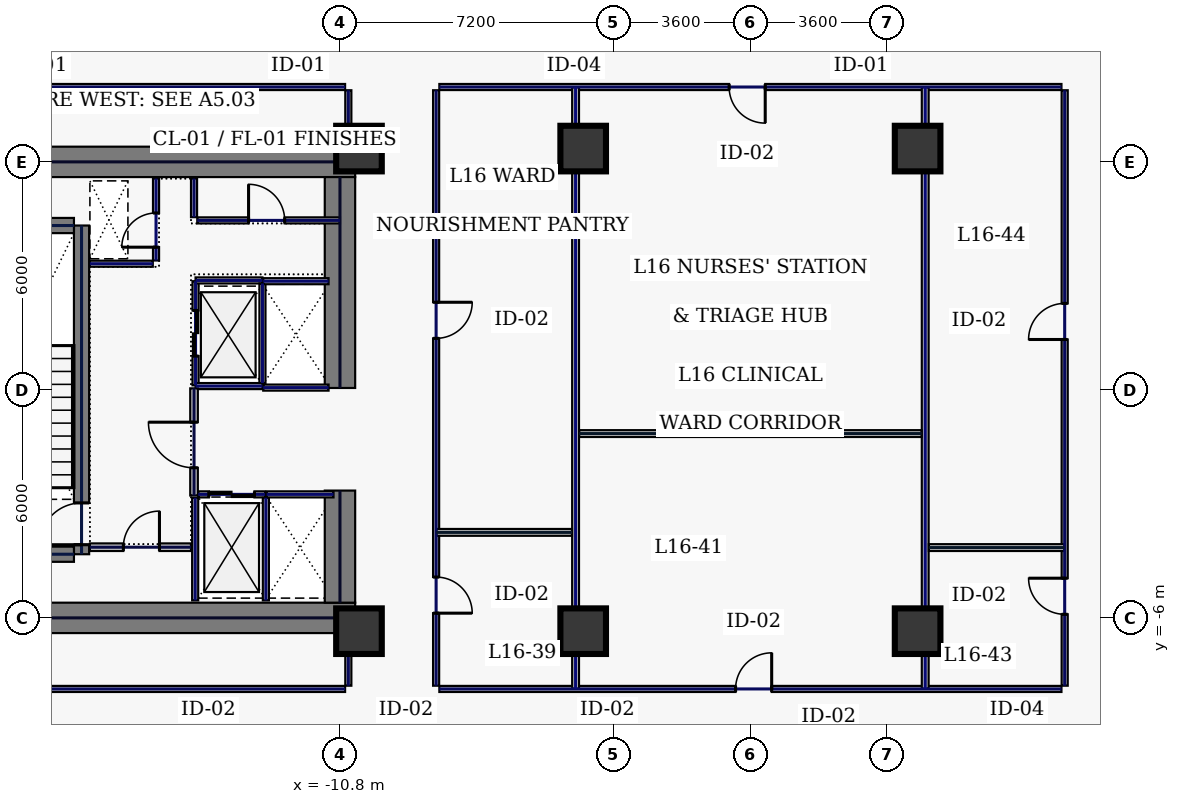
"""IFC4 building model, lengths in metres.
Left out: names, types, materials, properties, quantities, classifications, styles, units other than length and angle.
Written with IfcOpenShell. Run it as: python <this file> out.ifc"""

import sys

from ifc_helpers import new_model, si_unit, direction, frame, frame_2d, origin, origin_2d, place, context, subcontext, project, spatial, rectangle, hollow_rectangle, extrude, element, fill, save


model = new_model("IFC4")
c1 = context("Model", 3, precision=1e-05, world=origin(), true_north=direction((0.0, 1.0)))
c2 = subcontext(c1, "Body", "Model", "MODEL_VIEW")
j1 = project(units=[si_unit("LENGTHUNIT", "METRE"), si_unit("PLANEANGLEUNIT", "RADIAN")], contexts=[c1])
p1 = place(None, origin())
s1 = spatial("IfcSite", under=j1, at=p1, CompositionType="ELEMENT")
p2 = place(p1, origin())
s2 = spatial("IfcBuilding", under=s1, at=p2, CompositionType="ELEMENT")
p3 = place(p2, frame((0.0, 0.0, 75.4)))
s3 = spatial("IfcBuildingStorey", under=s2, at=p3, CompositionType="ELEMENT", Elevation=75.4)
for number, where, z_axis, x_axis in (
    (1, (-22.0, 6.0, 0.0), (0.0, 0.0, 1.0), (1.0, 0.0, 0.0)),
    (2, (-22.0, -6.0, 0.0), (0.0, 0.0, 1.0), (1.0, 0.0, 0.0)),
):
    element("IfcWall", number, at=place(p3, frame(where, z_axis=z_axis, x_axis=x_axis)), inside=s3, PredefinedType="SHEAR", context=c2, shape_type="SweptSolid", body=[
        extrude(rectangle(XDim=11.6, YDim=0.8, at=frame_2d((5.8, 0.0))), origin(), (0.0, 0.0, 1.0), 3.74),
    ])
p4 = place(p3, frame((-10.8, -5.6, 0.0), z_axis=(0.0, 0.0, 1.0), x_axis=(0.0, 1.0, 0.0)))
e3 = element("IfcWall", 3, at=p4, inside=s3, PredefinedType="SHEAR", context=c2, shape_type="SweptSolid", body=[
    extrude(rectangle(XDim=2.95, YDim=0.8, at=frame_2d((1.475, 0.0))), origin(), (0.0, 0.0, 1.0), 3.74),
])
p5 = place(p3, frame((-10.8, 0.05, 0.0), z_axis=(0.0, 0.0, 1.0), x_axis=(0.0, 1.0, 0.0)))
e4 = element("IfcWall", 4, at=p5, inside=s3, PredefinedType="SHEAR", context=c2, shape_type="SweptSolid", body=[
    extrude(rectangle(XDim=5.55, YDim=0.8, at=frame_2d((2.775, 0.0))), origin(), (0.0, 0.0, 1.0), 3.74),
])
p6 = place(p3, frame((-17.6, -4.325, 0.0), z_axis=(0.0, 0.0, 1.0), x_axis=(0.0, 1.0, 0.0)))
e5 = element("IfcWall", 5, at=p6, inside=s3, PredefinedType="SHEAR", context=c2, shape_type="SweptSolid", body=[
    extrude(rectangle(XDim=8.65, YDim=0.4, at=frame_2d((4.325, 0.0))), origin(), (0.0, 0.0, 1.0), 3.74),
])
p7 = place(p6, frame((0.25, 0.0, 0.0)))
e6 = element("IfcOpeningElement", 6, at=p7, cuts=e5, PredefinedType="OPENING", context=c2, shape_type="SweptSolid", body=[
    extrude(rectangle(XDim=1.1, YDim=2.2, at=frame_2d((0.55, 1.1))), frame((0.0, 0.21, 0.0), z_axis=(0.0, -1.0, 0.0), x_axis=(1.0, 0.0, 0.0)), (0.0, 0.0, 1.0), 0.42),
])
for number, where, z_axis, x_axis in (
    (7, (-21.2, -4.325, 0.0), (0.0, 0.0, 1.0), (1.0, 0.0, 0.0)),
    (8, (-21.2, 4.325, 0.0), (0.0, 0.0, 1.0), (1.0, 0.0, 0.0)),
):
    element("IfcWall", number, at=place(p3, frame(where, z_axis=z_axis, x_axis=x_axis)), inside=s3, PredefinedType="SHEAR", context=c2, shape_type="SweptSolid", body=[
        extrude(rectangle(XDim=3.4, YDim=0.4, at=frame_2d((1.7, 0.0))), origin(), (0.0, 0.0, 1.0), 3.74),
    ])
for number, where, z_axis, x_axis in (
    (9, (-10.3, -6.35, 0.0), (0.0, 0.0, 1.0), (1.0, 0.0, 0.0)),
    (10, (-10.3, 6.35, 0.0), (0.0, 0.0, 1.0), (1.0, 0.0, 0.0)),
    (11, (-4.4, -6.35, 0.0), (0.0, 0.0, 1.0), (1.0, 0.0, 0.0)),
    (12, (4.4, -6.35, 0.0), (0.0, 0.0, 1.0), (1.0, 0.0, 0.0)),
    (13, (-4.4, 6.35, 0.0), (0.0, 0.0, 1.0), (1.0, 0.0, 0.0)),
    (14, (4.4, 6.35, 0.0), (0.0, 0.0, 1.0), (1.0, 0.0, 0.0)),
):
    element("IfcColumn", number, at=place(p3, frame(where, z_axis=z_axis, x_axis=x_axis)), inside=s3, PredefinedType="COLUMN", context=c2, shape_type="SweptSolid", body=[
        extrude(hollow_rectangle(XDim=1.2, YDim=1.2, WallThickness=0.05, at=origin_2d()), origin(), (0.0, 0.0, 1.0), 3.74),
    ])
p8 = place(p3, frame((-14.6, 0.12, 0.0), z_axis=(0.0, 0.0, 1.0), x_axis=(0.0, 1.0, 0.0)))
e15 = element("IfcWall", 15, at=p8, inside=s3, PredefinedType="PARTITIONING", context=c2, shape_type="SweptSolid", body=[
    extrude(rectangle(XDim=2.74, YDim=0.16, at=frame_2d((1.37, 0.0))), origin(), (0.0, 0.0, 1.0), 3.74),
])
p9 = place(p8, frame((0.77, 0.0, 0.0)))
e16 = element("IfcOpeningElement", 16, at=p9, cuts=e15, PredefinedType="OPENING", context=c2, shape_type="SweptSolid", body=[
    extrude(rectangle(XDim=1.2, YDim=2.2, at=frame_2d((0.6, 1.1))), frame((0.0, 0.09, 0.0), z_axis=(0.0, -1.0, 0.0), x_axis=(1.0, 0.0, 0.0)), (0.0, 0.0, 1.0), 0.18),
])
for number, where, z_axis, x_axis in (
    (17, (-14.6, 0.1, 0.0), (0.0, 0.0, 1.0), (1.0, 0.0, 0.0)),
    (18, (-14.6, 2.88, 0.0), (0.0, 0.0, 1.0), (1.0, 0.0, 0.0)),
):
    element("IfcWall", number, at=place(p3, frame(where, z_axis=z_axis, x_axis=x_axis)), inside=s3, PredefinedType="PARTITIONING", context=c2, shape_type="SweptSolid", body=[
        extrude(rectangle(XDim=1.76, YDim=0.16, at=frame_2d((0.88, 0.0))), origin(), (0.0, 0.0, 1.0), 3.74),
    ])
p10 = place(p3, frame((-12.84, 0.18, 0.0), z_axis=(0.0, 0.0, 1.0), x_axis=(0.0, 1.0, 0.0)))
e19 = element("IfcWall", 19, at=p10, inside=s3, PredefinedType="PARTITIONING", context=c2, shape_type="SweptSolid", body=[
    extrude(rectangle(XDim=2.62, YDim=0.16, at=frame_2d((1.31, 0.0))), origin(), (0.0, 0.0, 1.0), 3.74),
])
p11 = place(p3, frame((-14.53, -2.75, 0.0), z_axis=(0.0, 0.0, 1.0), x_axis=(1.0, 0.0, 0.0)))
e20 = element("IfcWall", 20, at=p11, inside=s3, PredefinedType="PARTITIONING", context=c2, shape_type="SweptSolid", body=[
    extrude(rectangle(XDim=1.76, YDim=0.16, at=frame_2d((0.88, 0.0))), origin(), (0.0, 0.0, 1.0), 3.74),
])
p12 = place(p11, frame((0.28, 0.0, 0.0)))
e21 = element("IfcOpeningElement", 21, at=p12, cuts=e20, PredefinedType="OPENING", context=c2, shape_type="SweptSolid", body=[
    extrude(rectangle(XDim=1.2, YDim=2.2, at=frame_2d((0.6, 1.1))), frame((0.0, 0.09, 0.0), z_axis=(0.0, -1.0, 0.0), x_axis=(1.0, 0.0, 0.0)), (0.0, 0.0, 1.0), 0.18),
])
for number, where, z_axis, x_axis in (
    (22, (-12.75, -5.54, 0.0), (0.0, 0.0, 1.0), (0.0, 1.0, 0.0)),
    (23, (-14.61, -5.54, 0.0), (0.0, 0.0, 1.0), (0.0, 1.0, 0.0)),
):
    element("IfcWall", number, at=place(p3, frame(where, z_axis=z_axis, x_axis=x_axis)), inside=s3, PredefinedType="PARTITIONING", context=c2, shape_type="SweptSolid", body=[
        extrude(rectangle(XDim=2.7, YDim=0.16, at=frame_2d((1.35, 0.0))), origin(), (0.0, 0.0, 1.0), 3.74),
    ])
p13 = place(p3, frame((-12.73, -2.75, 0.0), z_axis=(0.0, 0.0, 1.0), x_axis=(1.0, 0.0, 0.0)))
e24 = element("IfcWall", 24, at=p13, inside=s3, PredefinedType="PARTITIONING", context=c2, shape_type="SweptSolid", body=[
    extrude(rectangle(XDim=1.76, YDim=0.16, at=frame_2d((0.88, 0.0))), origin(), (0.0, 0.0, 1.0), 3.74),
])
for number, where, z_axis, x_axis in (
    (25, (-12.82, 0.06, 0.0), (0.0, 0.0, 1.0), (1.0, 0.0, 0.0)),
    (26, (-12.82, 2.86, 0.0), (0.0, 0.0, 1.0), (1.0, 0.0, 0.0)),
):
    element("IfcWall", number, at=place(p3, frame(where, z_axis=z_axis, x_axis=x_axis)), inside=s3, PredefinedType="PARTITIONING", context=c2, shape_type="SweptSolid", body=[
        extrude(rectangle(XDim=1.72, YDim=0.16, at=frame_2d((0.86, 0.0))), origin(), (0.0, 0.0, 1.0), 3.74),
    ])
p14 = place(p3, frame((-15.64, 3.405, 0.0), z_axis=(0.0, 0.0, 1.0), x_axis=(0.0, 1.0, 0.0)))
e27 = element("IfcWall", 27, at=p14, inside=s3, PredefinedType="PARTITIONING", context=c2, shape_type="SweptSolid", body=[
    extrude(rectangle(XDim=2.155, YDim=0.16, at=frame_2d((1.078, 0.0))), origin(), (0.0, 0.0, 1.0), 3.74),
])
p15 = place(p14, frame((0.35, 0.0, 0.0)))
e28 = element("IfcOpeningElement", 28, at=p15, cuts=e27, PredefinedType="OPENING", context=c2, shape_type="SweptSolid", body=[
    extrude(rectangle(XDim=0.9, YDim=2.2, at=frame_2d((0.45, 1.1))), frame((0.0, 0.09, 0.0), z_axis=(0.0, -1.0, 0.0), x_axis=(1.0, 0.0, 0.0)), (0.0, 0.0, 1.0), 0.18),
])
p16 = place(p3, frame((-17.38, 3.32, 0.0), z_axis=(0.0, 0.0, 1.0), x_axis=(1.0, 0.0, 0.0)))
e29 = element("IfcWall", 29, at=p16, inside=s3, PredefinedType="PARTITIONING", context=c2, shape_type="SweptSolid", body=[
    extrude(rectangle(XDim=1.655, YDim=0.16, at=frame_2d((0.827, 0.0))), origin(), (0.0, 0.0, 1.0), 3.74),
])
p17 = place(p3, frame((-17.38, -4.14, 0.0), z_axis=(0.0, 0.0, 1.0), x_axis=(1.0, 0.0, 0.0)))
e30 = element("IfcWall", 30, at=p17, inside=s3, PredefinedType="SOLIDWALL", context=c2, shape_type="SweptSolid", body=[
    extrude(rectangle(XDim=2.66, YDim=0.2, at=frame_2d((1.33, 0.0))), origin(), (0.0, 0.0, 1.0), 3.74),
])
p18 = place(p17, frame((0.88, 0.0, 0.0)))
e31 = element("IfcOpeningElement", 31, at=p18, cuts=e30, PredefinedType="OPENING", context=c2, shape_type="SweptSolid", body=[
    extrude(rectangle(XDim=0.95, YDim=2.2, at=frame_2d((0.475, 1.1))), frame((0.0, 0.11, 0.0), z_axis=(0.0, -1.0, 0.0), x_axis=(1.0, 0.0, 0.0)), (0.0, 0.0, 1.0), 0.22),
])
p19 = place(p3, frame((-14.555, 4.46, 0.0), z_axis=(0.0, 0.0, 1.0), x_axis=(1.0, 0.0, 0.0)))
e32 = element("IfcWall", 32, at=p19, inside=s3, PredefinedType="PARTITIONING", context=c2, shape_type="SweptSolid", body=[
    extrude(rectangle(XDim=3.755, YDim=0.16, at=frame_2d((1.877, 0.0))), origin(), (0.0, 0.0, 1.0), 3.74),
])
p20 = place(p19, frame((1.35, 0.0, 0.0)))
e33 = element("IfcOpeningElement", 33, at=p20, cuts=e32, PredefinedType="OPENING", context=c2, shape_type="SweptSolid", body=[
    extrude(rectangle(XDim=0.95, YDim=2.2, at=frame_2d((0.475, 1.1))), frame((0.0, 0.09, 0.0), z_axis=(0.0, -1.0, 0.0), x_axis=(1.0, 0.0, 0.0)), (0.0, 0.0, 1.0), 0.18),
])
p21 = place(p3, frame((-14.64, 4.545, 0.0), z_axis=(0.0, 0.0, 1.0), x_axis=(0.0, 1.0, 0.0)))
e34 = element("IfcWall", 34, at=p21, inside=s3, PredefinedType="PARTITIONING", context=c2, shape_type="SweptSolid", body=[
    extrude(rectangle(XDim=1.015, YDim=0.16, at=frame_2d((0.508, 0.0))), origin(), (0.0, 0.0, 1.0), 3.74),
])
p22 = place(p3, frame((-14.64, -2.78, 0.0), z_axis=(0.0, 0.0, 1.0), x_axis=(0.0, 1.0, 0.0)))
e35 = element("IfcWall", 35, at=p22, inside=s3, PredefinedType="SOLIDWALL", context=c2, shape_type="SweptSolid", body=[
    extrude(rectangle(XDim=2.82, YDim=0.2, at=frame_2d((1.41, 0.0))), origin(), (0.0, 0.0, 1.0), 3.74),
])
p23 = place(p22, frame((0.73, 0.0, 0.0)))
e36 = element("IfcOpeningElement", 36, at=p23, cuts=e35, PredefinedType="OPENING", context=c2, shape_type="SweptSolid", body=[
    extrude(rectangle(XDim=1.2, YDim=2.2, at=frame_2d((0.6, 1.1))), frame((0.0, 0.11, 0.0), z_axis=(0.0, -1.0, 0.0), x_axis=(1.0, 0.0, 0.0)), (0.0, 0.0, 1.0), 0.22),
])
p24 = place(p3, frame((8.27, -7.785, 0.0), z_axis=(0.0, 0.0, 1.0), x_axis=(0.0, 1.0, 0.0)))
e37 = element("IfcWall", 37, at=p24, inside=s3, PredefinedType="PARTITIONING", context=c2, shape_type="SweptSolid", body=[
    extrude(rectangle(XDim=15.67, YDim=0.16, at=frame_2d((7.835, 0.0))), origin(), (0.0, 0.0, 1.0), 3.74),
])
p25 = place(p24, frame((1.879, 0.0, 0.0)))
e38 = element("IfcOpeningElement", 38, at=p25, cuts=e37, PredefinedType="OPENING", context=c2, shape_type="SweptSolid", body=[
    extrude(rectangle(XDim=0.95, YDim=2.2, at=frame_2d((0.475, 1.1))), frame((0.0, 0.09, 0.0), z_axis=(0.0, -1.0, 0.0), x_axis=(1.0, 0.0, 0.0)), (0.0, 0.0, 1.0), 0.18),
])
p26 = place(p24, frame((9.111, 0.0, 0.0)))
e39 = element("IfcOpeningElement", 39, at=p26, cuts=e37, PredefinedType="OPENING", context=c2, shape_type="SweptSolid", body=[
    extrude(rectangle(XDim=0.95, YDim=2.2, at=frame_2d((0.475, 1.1))), frame((0.0, 0.09, 0.0), z_axis=(0.0, -1.0, 0.0), x_axis=(1.0, 0.0, 0.0)), (0.0, 0.0, 1.0), 0.18),
])
p27 = place(p3, frame((8.185, 7.97, 0.0), z_axis=(0.0, 0.0, 1.0), x_axis=(-1.0, 0.0, 0.0)))
e40 = element("IfcWall", 40, at=p27, inside=s3, PredefinedType="PARTITIONING", context=c2, shape_type="SweptSolid", body=[
    extrude(rectangle(XDim=16.37, YDim=0.16, at=frame_2d((8.185, 0.0))), origin(), (0.0, 0.0, 1.0), 3.74),
])
p28 = place(p27, frame((7.795, 0.0, 0.0)))
e41 = element("IfcOpeningElement", 41, at=p28, cuts=e40, PredefinedType="OPENING", context=c2, shape_type="SweptSolid", body=[
    extrude(rectangle(XDim=0.95, YDim=2.2, at=frame_2d((0.475, 1.1))), frame((0.0, 0.09, 0.0), z_axis=(0.0, -1.0, 0.0), x_axis=(1.0, 0.0, 0.0)), (0.0, 0.0, 1.0), 0.18),
])
p29 = place(p3, frame((-8.27, 7.885, 0.0), z_axis=(0.0, 0.0, 1.0), x_axis=(0.0, -1.0, 0.0)))
e42 = element("IfcWall", 42, at=p29, inside=s3, PredefinedType="PARTITIONING", context=c2, shape_type="SweptSolid", body=[
    extrude(rectangle(XDim=15.67, YDim=0.16, at=frame_2d((7.835, 0.0))), origin(), (0.0, 0.0, 1.0), 3.74),
])
p30 = place(p29, frame((12.811, 0.0, 0.0)))
e43 = element("IfcOpeningElement", 43, at=p30, cuts=e42, PredefinedType="OPENING", context=c2, shape_type="SweptSolid", body=[
    extrude(rectangle(XDim=0.95, YDim=2.2, at=frame_2d((0.475, 1.1))), frame((0.0, 0.09, 0.0), z_axis=(0.0, -1.0, 0.0), x_axis=(1.0, 0.0, 0.0)), (0.0, 0.0, 1.0), 0.18),
])
p31 = place(p29, frame((5.579, 0.0, 0.0)))
e44 = element("IfcOpeningElement", 44, at=p31, cuts=e42, PredefinedType="OPENING", context=c2, shape_type="SweptSolid", body=[
    extrude(rectangle(XDim=0.95, YDim=2.2, at=frame_2d((0.475, 1.1))), frame((0.0, 0.09, 0.0), z_axis=(0.0, -1.0, 0.0), x_axis=(1.0, 0.0, 0.0)), (0.0, 0.0, 1.0), 0.18),
])
p32 = place(p3, frame((-8.185, -7.87, 0.0), z_axis=(0.0, 0.0, 1.0), x_axis=(1.0, 0.0, 0.0)))
e45 = element("IfcWall", 45, at=p32, inside=s3, PredefinedType="PARTITIONING", context=c2, shape_type="SweptSolid", body=[
    extrude(rectangle(XDim=16.37, YDim=0.16, at=frame_2d((8.185, 0.0))), origin(), (0.0, 0.0, 1.0), 3.74),
])
p33 = place(p32, frame((7.795, 0.0, 0.0)))
e46 = element("IfcOpeningElement", 46, at=p33, cuts=e45, PredefinedType="OPENING", context=c2, shape_type="SweptSolid", body=[
    extrude(rectangle(XDim=0.95, YDim=2.2, at=frame_2d((0.475, 1.1))), frame((0.0, 0.09, 0.0), z_axis=(0.0, -1.0, 0.0), x_axis=(1.0, 0.0, 0.0)), (0.0, 0.0, 1.0), 0.18),
])
p34 = place(p3, frame((-10.58, -7.785, 0.0), z_axis=(0.0, 0.0, 1.0), x_axis=(0.0, 1.0, 0.0)))
e47 = element("IfcWall", 47, at=p34, inside=s3, PredefinedType="PARTITIONING", context=c2, shape_type="SweptSolid", body=[
    extrude(rectangle(XDim=1.365, YDim=0.16, at=frame_2d((0.683, 0.0))), origin(), (0.0, 0.0, 1.0), 3.74),
])
p35 = place(p3, frame((-10.58, 6.42, 0.0), z_axis=(0.0, 0.0, 1.0), x_axis=(0.0, 1.0, 0.0)))
e48 = element("IfcWall", 48, at=p35, inside=s3, PredefinedType="PARTITIONING", context=c2, shape_type="SweptSolid", body=[
    extrude(rectangle(XDim=1.465, YDim=0.16, at=frame_2d((0.732, 0.0))), origin(), (0.0, 0.0, 1.0), 3.74),
])
for number, where, z_axis, x_axis in (
    (49, (-10.665, 7.97, 0.0), (0.0, 0.0, 1.0), (-1.0, 0.0, 0.0)),
    (50, (-27.185, -7.87, 0.0), (0.0, 0.0, 1.0), (1.0, 0.0, 0.0)),
):
    element("IfcWall", number, at=place(p3, frame(where, z_axis=z_axis, x_axis=x_axis)), inside=s3, PredefinedType="PARTITIONING", context=c2, shape_type="SweptSolid", body=[
        extrude(rectangle(XDim=16.52, YDim=0.16, at=frame_2d((8.26, 0.0))), origin(), (0.0, 0.0, 1.0), 3.74),
    ])
for number, where, z_axis, x_axis in (
    (51, (-4.6, -7.865, 0.0), (0.0, 0.0, 1.0), (0.0, 1.0, 0.0)),
    (52, (4.6, -7.865, 0.0), (0.0, 0.0, 1.0), (0.0, 1.0, 0.0)),
):
    element("IfcWall", number, at=place(p3, frame(where, z_axis=z_axis, x_axis=x_axis)), inside=s3, PredefinedType="PARTITIONING", context=c2, shape_type="SweptSolid", body=[
        extrude(rectangle(XDim=15.83, YDim=0.18, at=frame_2d((7.915, 0.0))), origin(), (0.0, 0.0, 1.0), 2.935),
    ])
p36 = place(p3, frame((-4.505, -1.15, 0.0), z_axis=(0.0, 0.0, 1.0), x_axis=(1.0, 0.0, 0.0)))
e53 = element("IfcWall", 53, at=p36, inside=s3, PredefinedType="PARTITIONING", context=c2, shape_type="SweptSolid", body=[
    extrude(rectangle(XDim=9.01, YDim=0.18, at=frame_2d((4.505, 0.0))), origin(), (0.0, 0.0, 1.0), 3.74),
])
for number, where, z_axis, x_axis in (
    (54, (-8.265, -3.75, 0.0), (0.0, 0.0, 1.0), (1.0, 0.0, 0.0)),
    (55, (4.695, -4.15, 0.0), (0.0, 0.0, 1.0), (1.0, 0.0, 0.0)),
):
    element("IfcWall", number, at=place(p3, frame(where, z_axis=z_axis, x_axis=x_axis)), inside=s3, PredefinedType="PARTITIONING", context=c2, shape_type="SweptSolid", body=[
        extrude(rectangle(XDim=3.57, YDim=0.18, at=frame_2d((1.785, 0.0))), origin(), (0.0, 0.0, 1.0), 3.74),
    ])
p37 = place(p7, origin())
e56 = element("IfcDoor", 56, at=p37, inside=s3, OperationType="SINGLE_SWING_LEFT", PredefinedType="DOOR", context=c2, shape_type="SweptSolid", body=[
    extrude(rectangle(XDim=1.1, YDim=2.2, at=frame_2d((0.55, 1.1))), frame((0.0, 0.025, 0.0), z_axis=(0.0, -1.0, 0.0), x_axis=(1.0, 0.0, 0.0)), (0.0, 0.0, 1.0), 0.05),
])
fill(e6, e56)
p38 = place(p9, origin())
e57 = element("IfcDoor", 57, at=p38, inside=s3, OperationType="SLIDING_TO_LEFT", PredefinedType="DOOR", context=c2, shape_type="SweptSolid", body=[
    extrude(rectangle(XDim=1.2, YDim=2.2, at=frame_2d((0.6, 1.1))), frame((0.0, 0.025, 0.0), z_axis=(0.0, -1.0, 0.0), x_axis=(1.0, 0.0, 0.0)), (0.0, 0.0, 1.0), 0.05),
])
fill(e16, e57)
p39 = place(p12, origin())
e58 = element("IfcDoor", 58, at=p39, inside=s3, OperationType="SLIDING_TO_LEFT", PredefinedType="DOOR", context=c2, shape_type="SweptSolid", body=[
    extrude(rectangle(XDim=1.2, YDim=2.2, at=frame_2d((0.6, 1.1))), frame((0.0, 0.025, 0.0), z_axis=(0.0, -1.0, 0.0), x_axis=(1.0, 0.0, 0.0)), (0.0, 0.0, 1.0), 0.05),
])
fill(e21, e58)
p40 = place(p15, origin())
e59 = element("IfcDoor", 59, at=p40, inside=s3, OperationType="SINGLE_SWING_LEFT", PredefinedType="DOOR", context=c2, shape_type="SweptSolid", body=[
    extrude(rectangle(XDim=0.9, YDim=2.2, at=frame_2d((0.45, 1.1))), frame((0.0, 0.025, 0.0), z_axis=(0.0, -1.0, 0.0), x_axis=(1.0, 0.0, 0.0)), (0.0, 0.0, 1.0), 0.05),
])
fill(e28, e59)
p41 = place(p18, origin())
e60 = element("IfcDoor", 60, at=p41, inside=s3, OperationType="SINGLE_SWING_RIGHT", PredefinedType="DOOR", context=c2, shape_type="SweptSolid", body=[
    extrude(rectangle(XDim=0.95, YDim=2.2, at=frame_2d((0.475, 1.1))), frame((0.0, 0.025, 0.0), z_axis=(0.0, -1.0, 0.0), x_axis=(1.0, 0.0, 0.0)), (0.0, 0.0, 1.0), 0.05),
])
fill(e31, e60)
p42 = place(p20, origin())
e61 = element("IfcDoor", 61, at=p42, inside=s3, OperationType="SINGLE_SWING_LEFT", PredefinedType="DOOR", context=c2, shape_type="SweptSolid", body=[
    extrude(rectangle(XDim=0.95, YDim=2.2, at=frame_2d((0.475, 1.1))), frame((0.0, 0.025, 0.0), z_axis=(0.0, -1.0, 0.0), x_axis=(1.0, 0.0, 0.0)), (0.0, 0.0, 1.0), 0.05),
])
fill(e33, e61)
p43 = place(p23, origin())
e62 = element("IfcDoor", 62, at=p43, inside=s3, OperationType="SINGLE_SWING_RIGHT", PredefinedType="DOOR", context=c2, shape_type="SweptSolid", body=[
    extrude(rectangle(XDim=1.2, YDim=2.2, at=frame_2d((0.6, 1.1))), frame((0.0, 0.025, 0.0), z_axis=(0.0, -1.0, 0.0), x_axis=(1.0, 0.0, 0.0)), (0.0, 0.0, 1.0), 0.05),
])
fill(e36, e62)
p44 = place(p30, origin())
e63 = element("IfcDoor", 63, at=p44, inside=s3, OperationType="SINGLE_SWING_RIGHT", PredefinedType="DOOR", context=c2, shape_type="SweptSolid", body=[
    extrude(rectangle(XDim=0.95, YDim=2.2, at=frame_2d((0.475, 1.1))), frame((0.0, 0.025, 0.0), z_axis=(0.0, -1.0, 0.0), x_axis=(1.0, 0.0, 0.0)), (0.0, 0.0, 1.0), 0.05),
])
fill(e43, e63)
p45 = place(p31, origin())
e64 = element("IfcDoor", 64, at=p45, inside=s3, OperationType="SINGLE_SWING_LEFT", PredefinedType="DOOR", context=c2, shape_type="SweptSolid", body=[
    extrude(rectangle(XDim=0.95, YDim=2.2, at=frame_2d((0.475, 1.1))), frame((0.0, 0.025, 0.0), z_axis=(0.0, -1.0, 0.0), x_axis=(1.0, 0.0, 0.0)), (0.0, 0.0, 1.0), 0.05),
])
fill(e44, e64)
p46 = place(p33, origin())
e65 = element("IfcDoor", 65, at=p46, inside=s3, OperationType="SINGLE_SWING_RIGHT", PredefinedType="DOOR", context=c2, shape_type="SweptSolid", body=[
    extrude(rectangle(XDim=0.95, YDim=2.2, at=frame_2d((0.475, 1.1))), frame((0.0, 0.025, 0.0), z_axis=(0.0, -1.0, 0.0), x_axis=(1.0, 0.0, 0.0)), (0.0, 0.0, 1.0), 0.05),
])
fill(e46, e65)
p47 = place(p28, origin())
e66 = element("IfcDoor", 66, at=p47, inside=s3, OperationType="SINGLE_SWING_LEFT", PredefinedType="DOOR", context=c2, shape_type="SweptSolid", body=[
    extrude(rectangle(XDim=0.95, YDim=2.2, at=frame_2d((0.475, 1.1))), frame((0.0, 0.025, 0.0), z_axis=(0.0, -1.0, 0.0), x_axis=(1.0, 0.0, 0.0)), (0.0, 0.0, 1.0), 0.05),
])
fill(e41, e66)
p48 = place(p25, origin())
e67 = element("IfcDoor", 67, at=p48, inside=s3, OperationType="SINGLE_SWING_RIGHT", PredefinedType="DOOR", context=c2, shape_type="SweptSolid", body=[
    extrude(rectangle(XDim=0.95, YDim=2.2, at=frame_2d((0.475, 1.1))), frame((0.0, 0.025, 0.0), z_axis=(0.0, -1.0, 0.0), x_axis=(1.0, 0.0, 0.0)), (0.0, 0.0, 1.0), 0.05),
])
fill(e38, e67)
p49 = place(p26, origin())
e68 = element("IfcDoor", 68, at=p49, inside=s3, OperationType="SINGLE_SWING_LEFT", PredefinedType="DOOR", context=c2, shape_type="SweptSolid", body=[
    extrude(rectangle(XDim=0.95, YDim=2.2, at=frame_2d((0.475, 1.1))), frame((0.0, 0.025, 0.0), z_axis=(0.0, -1.0, 0.0), x_axis=(1.0, 0.0, 0.0)), (0.0, 0.0, 1.0), 0.05),
])
fill(e39, e68)
save(model, sys.argv[1])
